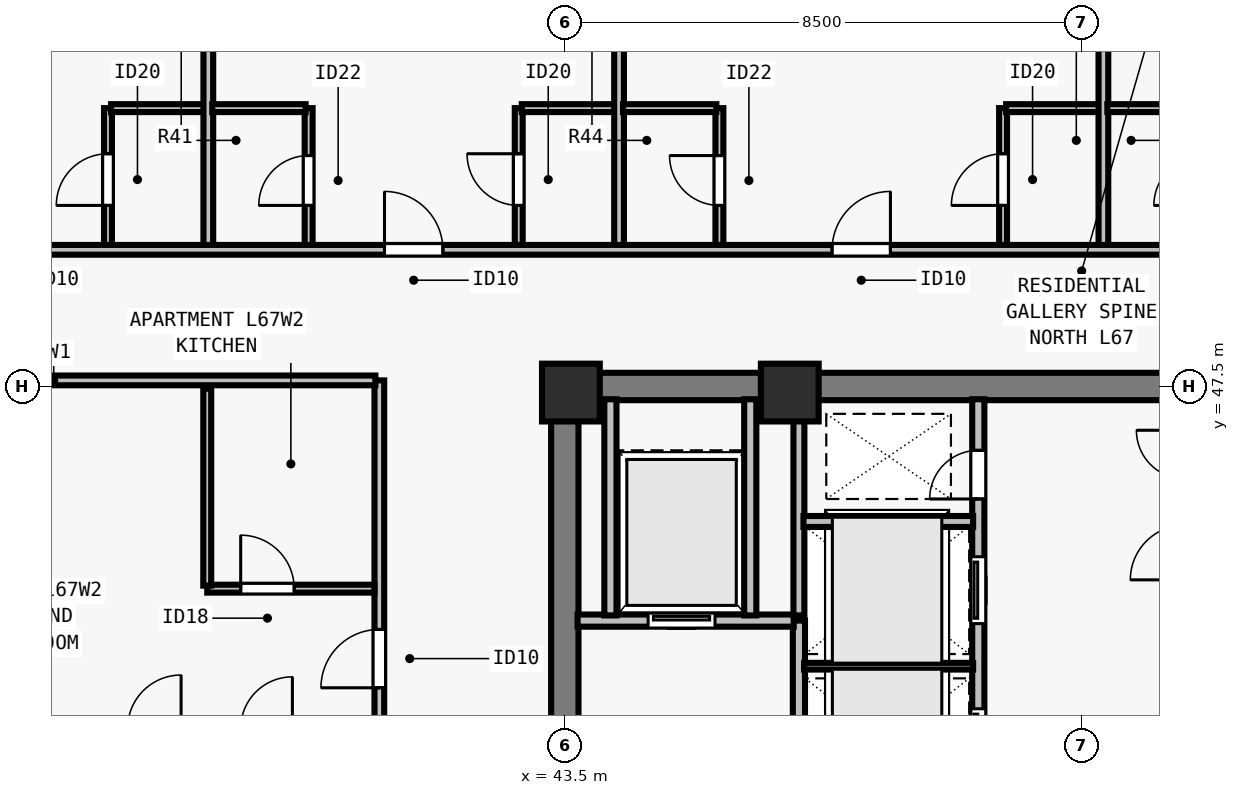
"""IFC4 building model, lengths in metres.
Left out: names, types, materials, properties, quantities, classifications, styles, units other than length and angle.
Written with IfcOpenShell. Run it as: python <this file> out.ifc"""

import sys

from ifc_helpers import new_model, si_unit, direction, frame, frame_2d, origin, origin_2d, place, context, subcontext, project, spatial, rectangle, extrude, element, fill, save


model = new_model("IFC4")
c1 = context("Model", 3, precision=1e-05, world=origin(), true_north=direction((0.0, 1.0)))
c2 = subcontext(c1, "Body", "Model", "MODEL_VIEW")
j1 = project(units=[si_unit("LENGTHUNIT", "METRE"), si_unit("PLANEANGLEUNIT", "RADIAN")], contexts=[c1])
p1 = place(None, origin())
s1 = spatial("IfcSite", under=j1, at=p1, CompositionType="ELEMENT")
p2 = place(p1, origin())
s2 = spatial("IfcBuilding", under=s1, at=p2, CompositionType="ELEMENT")
p3 = place(p2, frame((0.0, 0.0, 244.5)))
s3 = spatial("IfcBuildingStorey", under=s2, at=p3, CompositionType="ELEMENT", Elevation=244.5)
for number, where, z_axis, x_axis in (
    (1, (43.6, 47.4, 0.0), (0.0, 0.0, 1.0), (1.0, 0.0, 0.0)),
    (2, (47.2, 47.4, 0.0), (0.0, 0.0, 1.0), (1.0, 0.0, 0.0)),
):
    element("IfcColumn", number, at=place(p3, frame(where, z_axis=z_axis, x_axis=x_axis)), inside=s3, PredefinedType="COLUMN", context=c2, shape_type="SweptSolid", body=[
        extrude(rectangle(XDim=0.95, YDim=0.95, at=origin_2d()), origin(), (0.0, 0.0, 1.0), 3.5),
    ])
p4 = place(p3, frame((43.275, 47.5, 0.0), z_axis=(0.0, 0.0, 1.0), x_axis=(1.0, 0.0, 0.0)))
e3 = element("IfcWall", 3, at=p4, inside=s3, PredefinedType="SHEAR", context=c2, shape_type="SweptSolid", body=[
    extrude(rectangle(XDim=17.45, YDim=0.45, at=frame_2d((8.725, 0.0))), origin(), (0.0, 0.0, 1.0), 3.29),
])
p5 = place(p3, frame((43.5, 40.8, 0.0), z_axis=(0.0, 0.0, 1.0), x_axis=(0.0, 1.0, 0.0)))
e4 = element("IfcWall", 4, at=p5, inside=s3, PredefinedType="SHEAR", context=c2, shape_type="SweptSolid", body=[
    extrude(rectangle(XDim=6.485, YDim=0.45, at=frame_2d((3.242, 0.0))), origin(), (0.0, 0.0, 1.0), 3.29),
])
p6 = place(p3, frame((50.3, 40.585, 0.0), z_axis=(0.0, 0.0, 1.0), x_axis=(0.0, 1.0, 0.0)))
e5 = element("IfcWall", 5, at=p6, inside=s3, PredefinedType="SOLIDWALL", context=c2, shape_type="SweptSolid", body=[
    extrude(rectangle(XDim=6.705, YDim=0.2, at=frame_2d((3.353, 0.0))), origin(), (0.0, 0.0, 1.0), 3.29),
])
p7 = place(p6, frame((0.515, 0.0, 0.0)))
e6 = element("IfcOpeningElement", 6, at=p7, cuts=e5, PredefinedType="OPENING", context=c2, shape_type="SweptSolid", body=[
    extrude(rectangle(XDim=1.1, YDim=2.2, at=frame_2d((0.55, 1.1))), frame((0.0, 0.11, 0.0), z_axis=(0.0, -1.0, 0.0), x_axis=(1.0, 0.0, 0.0)), (0.0, 0.0, 1.0), 0.22),
])
p8 = place(p6, frame((3.015, 0.0, 0.0)))
e7 = element("IfcOpeningElement", 7, at=p8, cuts=e5, PredefinedType="OPENING", context=c2, shape_type="SweptSolid", body=[
    extrude(rectangle(XDim=1.1, YDim=2.2, at=frame_2d((0.55, 1.1))), frame((0.0, 0.11, 0.0), z_axis=(0.0, -1.0, 0.0), x_axis=(1.0, 0.0, 0.0)), (0.0, 0.0, 1.0), 0.22),
])
p9 = place(p6, frame((5.065, 0.0, 0.0)))
e8 = element("IfcOpeningElement", 8, at=p9, cuts=e5, PredefinedType="OPENING", context=c2, shape_type="SweptSolid", body=[
    extrude(rectangle(XDim=0.8, YDim=2.08, at=frame_2d((0.4, 1.04))), frame((0.0, 0.11, 0.0), z_axis=(0.0, -1.0, 0.0), x_axis=(1.0, 0.0, 0.0)), (0.0, 0.0, 1.0), 0.22),
])
p10 = place(p3, frame((47.35, 38.785, 0.0), z_axis=(0.0, 0.0, 1.0), x_axis=(0.0, 1.0, 0.0)))
e9 = element("IfcWall", 9, at=p10, inside=s3, PredefinedType="SOLIDWALL", context=c2, shape_type="SweptSolid", body=[
    extrude(rectangle(XDim=4.865, YDim=0.2, at=frame_2d((2.433, 0.0))), origin(), (0.0, 0.0, 1.0), 3.29),
])
p11 = place(p10, frame((0.265, 0.0, 0.0)))
e10 = element("IfcOpeningElement", 10, at=p11, cuts=e9, PredefinedType="OPENING", context=c2, shape_type="SweptSolid", body=[
    extrude(rectangle(XDim=1.0, YDim=2.15, at=frame_2d((0.5, 1.075))), frame((0.0, 0.11, 0.0), z_axis=(0.0, -1.0, 0.0), x_axis=(1.0, 0.0, 0.0)), (0.0, 0.0, 1.0), 0.22),
])
p12 = place(p3, frame((43.71, 43.65, 0.0), z_axis=(0.0, 0.0, 1.0), x_axis=(1.0, 0.0, 0.0)))
e11 = element("IfcWall", 11, at=p12, inside=s3, PredefinedType="SOLIDWALL", context=c2, shape_type="SweptSolid", body=[
    extrude(rectangle(XDim=3.555, YDim=0.2, at=frame_2d((1.777, 0.0))), origin(), (0.0, 0.0, 1.0), 3.29),
])
p13 = place(p12, frame((1.16, 0.0, 0.0)))
e12 = element("IfcOpeningElement", 12, at=p13, cuts=e11, PredefinedType="OPENING", context=c2, shape_type="SweptSolid", body=[
    extrude(rectangle(XDim=1.1, YDim=2.2, at=frame_2d((0.55, 1.1))), frame((0.0, 0.11, 0.0), z_axis=(0.0, -1.0, 0.0), x_axis=(1.0, 0.0, 0.0)), (0.0, 0.0, 1.0), 0.22),
])
for number, where, z_axis, x_axis in (
    (13, (46.55, 43.735, 0.0), (0.0, 0.0, 1.0), (0.0, 1.0, 0.0)),
    (14, (44.25, 43.735, 0.0), (0.0, 0.0, 1.0), (0.0, 1.0, 0.0)),
):
    element("IfcWall", number, at=place(p3, frame(where, z_axis=z_axis, x_axis=x_axis)), inside=s3, PredefinedType="SOLIDWALL", context=c2, shape_type="SweptSolid", body=[
        extrude(rectangle(XDim=3.555, YDim=0.2, at=frame_2d((1.777, 0.0))), origin(), (0.0, 0.0, 1.0), 3.29),
    ])
p14 = place(p3, frame((47.35, 43.735, 0.0), z_axis=(0.0, 0.0, 1.0), x_axis=(0.0, 1.0, 0.0)))
e15 = element("IfcWall", 15, at=p14, inside=s3, PredefinedType="SOLIDWALL", context=c2, shape_type="SweptSolid", body=[
    extrude(rectangle(XDim=3.555, YDim=0.18, at=frame_2d((1.777, 0.0))), origin(), (0.0, 0.0, 1.0), 3.29),
])
p15 = place(p3, frame((47.435, 42.9, 0.0), z_axis=(0.0, 0.0, 1.0), x_axis=(1.0, 0.0, 0.0)))
e16 = element("IfcWall", 16, at=p15, inside=s3, PredefinedType="PARTITIONING", context=c2, shape_type="SweptSolid", body=[
    extrude(rectangle(XDim=2.78, YDim=0.11, at=frame_2d((1.39, 0.0))), origin(), (0.0, 0.0, 1.0), 3.29),
])
p16 = place(p3, frame((47.425, 45.28, 0.0), z_axis=(0.0, 0.0, 1.0), x_axis=(1.0, 0.0, 0.0)))
e17 = element("IfcWall", 17, at=p16, inside=s3, PredefinedType="SOLIDWALL", context=c2, shape_type="SweptSolid", body=[
    extrude(rectangle(XDim=2.79, YDim=0.18, at=frame_2d((1.395, 0.0))), origin(), (0.0, 0.0, 1.0), 3.29),
])
p17 = place(p3, frame((29.805, 49.748, 0.0), z_axis=(0.0, 0.0, 1.0), x_axis=(1.0, 0.0, 0.0)))
e18 = element("IfcWall", 18, at=p17, inside=s3, PredefinedType="PARTITIONING", context=c2, shape_type="SweptSolid", body=[
    extrude(rectangle(XDim=44.39, YDim=0.16, at=frame_2d((22.195, 0.0))), origin(), (0.0, 0.0, 1.0), 2.958),
])
p18 = place(p17, frame((3.494, 0.0, 0.0)))
e19 = element("IfcOpeningElement", 19, at=p18, cuts=e18, PredefinedType="OPENING", context=c2, shape_type="SweptSolid", body=[
    extrude(rectangle(XDim=0.96, YDim=2.18, at=frame_2d((0.48, 1.09))), frame((0.0, 0.09, 0.0), z_axis=(0.0, -1.0, 0.0), x_axis=(1.0, 0.0, 0.0)), (0.0, 0.0, 1.0), 0.18),
])
p19 = place(p17, frame((10.73, 0.0, 0.0)))
e20 = element("IfcOpeningElement", 20, at=p19, cuts=e18, PredefinedType="OPENING", context=c2, shape_type="SweptSolid", body=[
    extrude(rectangle(XDim=0.96, YDim=2.18, at=frame_2d((0.48, 1.09))), frame((0.0, 0.09, 0.0), z_axis=(0.0, -1.0, 0.0), x_axis=(1.0, 0.0, 0.0)), (0.0, 0.0, 1.0), 0.18),
])
p20 = place(p17, frame((18.09, 0.0, 0.0)))
e21 = element("IfcOpeningElement", 21, at=p20, cuts=e18, PredefinedType="OPENING", context=c2, shape_type="SweptSolid", body=[
    extrude(rectangle(XDim=0.96, YDim=2.18, at=frame_2d((0.48, 1.09))), frame((0.0, 0.09, 0.0), z_axis=(0.0, -1.0, 0.0), x_axis=(1.0, 0.0, 0.0)), (0.0, 0.0, 1.0), 0.18),
])
p21 = place(p17, frame((25.45, 0.0, 0.0)))
e22 = element("IfcOpeningElement", 22, at=p21, cuts=e18, PredefinedType="OPENING", context=c2, shape_type="SweptSolid", body=[
    extrude(rectangle(XDim=0.96, YDim=2.18, at=frame_2d((0.48, 1.09))), frame((0.0, 0.09, 0.0), z_axis=(0.0, -1.0, 0.0), x_axis=(1.0, 0.0, 0.0)), (0.0, 0.0, 1.0), 0.18),
])
p22 = place(p17, frame((32.81, 0.0, 0.0)))
e23 = element("IfcOpeningElement", 23, at=p22, cuts=e18, PredefinedType="OPENING", context=c2, shape_type="SweptSolid", body=[
    extrude(rectangle(XDim=0.96, YDim=2.18, at=frame_2d((0.48, 1.09))), frame((0.0, 0.09, 0.0), z_axis=(0.0, -1.0, 0.0), x_axis=(1.0, 0.0, 0.0)), (0.0, 0.0, 1.0), 0.18),
])
p23 = place(p17, frame((40.294, 0.0, 0.0)))
e24 = element("IfcOpeningElement", 24, at=p23, cuts=e18, PredefinedType="OPENING", context=c2, shape_type="SweptSolid", body=[
    extrude(rectangle(XDim=0.96, YDim=2.18, at=frame_2d((0.48, 1.09))), frame((0.0, 0.09, 0.0), z_axis=(0.0, -1.0, 0.0), x_axis=(1.0, 0.0, 0.0)), (0.0, 0.0, 1.0), 0.18),
])
p24 = place(p3, frame((40.45, 30.4, 0.0), z_axis=(0.0, 0.0, 1.0), x_axis=(0.0, 1.0, 0.0)))
e25 = element("IfcWall", 25, at=p24, inside=s3, PredefinedType="PARTITIONING", context=c2, shape_type="SweptSolid", body=[
    extrude(rectangle(XDim=17.2, YDim=0.16, at=frame_2d((8.6, 0.0))), origin(), (0.0, 0.0, 1.0), 3.29),
])
p25 = place(p24, frame((3.545, 0.0, 0.0)))
e26 = element("IfcOpeningElement", 26, at=p25, cuts=e25, PredefinedType="OPENING", context=c2, shape_type="SweptSolid", body=[
    extrude(rectangle(XDim=0.96, YDim=2.18, at=frame_2d((0.48, 1.09))), frame((0.0, 0.09, 0.0), z_axis=(0.0, -1.0, 0.0), x_axis=(1.0, 0.0, 0.0)), (0.0, 0.0, 1.0), 0.18),
])
p26 = place(p24, frame((12.145, 0.0, 0.0)))
e27 = element("IfcOpeningElement", 27, at=p26, cuts=e25, PredefinedType="OPENING", context=c2, shape_type="SweptSolid", body=[
    extrude(rectangle(XDim=0.96, YDim=2.18, at=frame_2d((0.48, 1.09))), frame((0.0, 0.09, 0.0), z_axis=(0.0, -1.0, 0.0), x_axis=(1.0, 0.0, 0.0)), (0.0, 0.0, 1.0), 0.18),
])
p27 = place(p3, frame((29.805, 47.6, 0.0), z_axis=(0.0, 0.0, 1.0), x_axis=(1.0, 0.0, 0.0)))
e28 = element("IfcWall", 28, at=p27, inside=s3, PredefinedType="PARTITIONING", context=c2, shape_type="SweptSolid", body=[
    extrude(rectangle(XDim=10.58, YDim=0.16, at=frame_2d((5.29, 0.0))), origin(), (0.0, 0.0, 1.0), 3.29),
])
p28 = place(p3, frame((35.988, 49.827, 0.0), z_axis=(0.0, 0.0, 1.0), x_axis=(0.0, 1.0, 0.0)))
e29 = element("IfcWall", 29, at=p28, inside=s3, PredefinedType="PLUMBINGWALL", context=c2, shape_type="SweptSolid", body=[
    extrude(rectangle(XDim=2.25, YDim=0.13, at=frame_2d((1.125, 0.0))), origin(), (0.0, 0.0, 1.0), 3.29),
])
p29 = place(p28, frame((0.65, 0.0, 0.0)))
e30 = element("IfcOpeningElement", 30, at=p29, cuts=e29, PredefinedType="OPENING", context=c2, shape_type="SweptSolid", body=[
    extrude(rectangle(XDim=0.85, YDim=2.1, at=frame_2d((0.425, 1.05))), frame((0.0, 0.075, 0.0), z_axis=(0.0, -1.0, 0.0), x_axis=(1.0, 0.0, 0.0)), (0.0, 0.0, 1.0), 0.15),
])
p30 = place(p3, frame((36.038, 52.077, 0.0), z_axis=(0.0, 0.0, 1.0), x_axis=(1.0, 0.0, 0.0)))
e31 = element("IfcWall", 31, at=p30, inside=s3, PredefinedType="PLUMBINGWALL", context=c2, shape_type="SweptSolid", body=[
    extrude(rectangle(XDim=1.6, YDim=0.13, at=frame_2d((0.8, 0.0))), origin(), (0.0, 0.0, 1.0), 2.958),
])
p31 = place(p3, frame((37.637, 49.827, 0.0), z_axis=(0.0, 0.0, 1.0), x_axis=(0.0, 1.0, 0.0)))
e32 = element("IfcWall", 32, at=p31, inside=s3, PredefinedType="PARTITIONING", context=c2, shape_type="SweptSolid", body=[
    extrude(rectangle(XDim=11.368, YDim=0.16, at=frame_2d((5.684, 0.0))), origin(), (0.0, 0.0, 1.0), 2.573),
])
p32 = place(p3, frame((39.288, 49.827, 0.0), z_axis=(0.0, 0.0, 1.0), x_axis=(0.0, 1.0, 0.0)))
e33 = element("IfcWall", 33, at=p32, inside=s3, PredefinedType="PLUMBINGWALL", context=c2, shape_type="SweptSolid", body=[
    extrude(rectangle(XDim=2.25, YDim=0.13, at=frame_2d((1.125, 0.0))), origin(), (0.0, 0.0, 1.0), 3.29),
])
p33 = place(p32, frame((0.65, 0.0, 0.0)))
e34 = element("IfcOpeningElement", 34, at=p33, cuts=e33, PredefinedType="OPENING", context=c2, shape_type="SweptSolid", body=[
    extrude(rectangle(XDim=0.82, YDim=2.1, at=frame_2d((0.41, 1.05))), frame((0.0, 0.075, 0.0), z_axis=(0.0, -1.0, 0.0), x_axis=(1.0, 0.0, 0.0)), (0.0, 0.0, 1.0), 0.15),
])
p34 = place(p3, frame((37.702, 52.077, 0.0), z_axis=(0.0, 0.0, 1.0), x_axis=(1.0, 0.0, 0.0)))
e35 = element("IfcWall", 35, at=p34, inside=s3, PredefinedType="PLUMBINGWALL", context=c2, shape_type="SweptSolid", body=[
    extrude(rectangle(XDim=1.535, YDim=0.13, at=frame_2d((0.768, 0.0))), origin(), (0.0, 0.0, 1.0), 3.29),
])
p35 = place(p3, frame((42.742, 49.827, 0.0), z_axis=(0.0, 0.0, 1.0), x_axis=(0.0, 1.0, 0.0)))
e36 = element("IfcWall", 36, at=p35, inside=s3, PredefinedType="PLUMBINGWALL", context=c2, shape_type="SweptSolid", body=[
    extrude(rectangle(XDim=2.25, YDim=0.13, at=frame_2d((1.125, 0.0))), origin(), (0.0, 0.0, 1.0), 3.29),
])
p36 = place(p35, frame((0.65, 0.0, 0.0)))
e37 = element("IfcOpeningElement", 37, at=p36, cuts=e36, PredefinedType="OPENING", context=c2, shape_type="SweptSolid", body=[
    extrude(rectangle(XDim=0.85, YDim=2.1, at=frame_2d((0.425, 1.05))), frame((0.0, 0.075, 0.0), z_axis=(0.0, -1.0, 0.0), x_axis=(1.0, 0.0, 0.0)), (0.0, 0.0, 1.0), 0.15),
])
p37 = place(p3, frame((42.792, 52.077, 0.0), z_axis=(0.0, 0.0, 1.0), x_axis=(1.0, 0.0, 0.0)))
e38 = element("IfcWall", 38, at=p37, inside=s3, PredefinedType="PLUMBINGWALL", context=c2, shape_type="SweptSolid", body=[
    extrude(rectangle(XDim=1.6, YDim=0.13, at=frame_2d((0.8, 0.0))), origin(), (0.0, 0.0, 1.0), 3.29),
])
p38 = place(p3, frame((44.393, 49.827, 0.0), z_axis=(0.0, 0.0, 1.0), x_axis=(0.0, 1.0, 0.0)))
e39 = element("IfcWall", 39, at=p38, inside=s3, PredefinedType="PARTITIONING", context=c2, shape_type="SweptSolid", body=[
    extrude(rectangle(XDim=11.368, YDim=0.16, at=frame_2d((5.684, 0.0))), origin(), (0.0, 0.0, 1.0), 3.29),
])
p39 = place(p3, frame((46.042, 49.827, 0.0), z_axis=(0.0, 0.0, 1.0), x_axis=(0.0, 1.0, 0.0)))
e40 = element("IfcWall", 40, at=p39, inside=s3, PredefinedType="PLUMBINGWALL", context=c2, shape_type="SweptSolid", body=[
    extrude(rectangle(XDim=2.25, YDim=0.13, at=frame_2d((1.125, 0.0))), origin(), (0.0, 0.0, 1.0), 3.29),
])
p40 = place(p39, frame((0.65, 0.0, 0.0)))
e41 = element("IfcOpeningElement", 41, at=p40, cuts=e40, PredefinedType="OPENING", context=c2, shape_type="SweptSolid", body=[
    extrude(rectangle(XDim=0.82, YDim=2.1, at=frame_2d((0.41, 1.05))), frame((0.0, 0.075, 0.0), z_axis=(0.0, -1.0, 0.0), x_axis=(1.0, 0.0, 0.0)), (0.0, 0.0, 1.0), 0.15),
])
p41 = place(p3, frame((44.458, 52.077, 0.0), z_axis=(0.0, 0.0, 1.0), x_axis=(1.0, 0.0, 0.0)))
e42 = element("IfcWall", 42, at=p41, inside=s3, PredefinedType="PLUMBINGWALL", context=c2, shape_type="SweptSolid", body=[
    extrude(rectangle(XDim=1.535, YDim=0.13, at=frame_2d((0.768, 0.0))), origin(), (0.0, 0.0, 1.0), 3.29),
])
p42 = place(p3, frame((50.708, 49.827, 0.0), z_axis=(0.0, 0.0, 1.0), x_axis=(0.0, 1.0, 0.0)))
e43 = element("IfcWall", 43, at=p42, inside=s3, PredefinedType="PLUMBINGWALL", context=c2, shape_type="SweptSolid", body=[
    extrude(rectangle(XDim=2.25, YDim=0.13, at=frame_2d((1.125, 0.0))), origin(), (0.0, 0.0, 1.0), 3.29),
])
p43 = place(p42, frame((0.65, 0.0, 0.0)))
e44 = element("IfcOpeningElement", 44, at=p43, cuts=e43, PredefinedType="OPENING", context=c2, shape_type="SweptSolid", body=[
    extrude(rectangle(XDim=0.85, YDim=2.1, at=frame_2d((0.425, 1.05))), frame((0.0, 0.075, 0.0), z_axis=(0.0, -1.0, 0.0), x_axis=(1.0, 0.0, 0.0)), (0.0, 0.0, 1.0), 0.15),
])
p44 = place(p3, frame((50.758, 52.077, 0.0), z_axis=(0.0, 0.0, 1.0), x_axis=(1.0, 0.0, 0.0)))
e45 = element("IfcWall", 45, at=p44, inside=s3, PredefinedType="PLUMBINGWALL", context=c2, shape_type="SweptSolid", body=[
    extrude(rectangle(XDim=1.6, YDim=0.13, at=frame_2d((0.8, 0.0))), origin(), (0.0, 0.0, 1.0), 3.29),
])
p45 = place(p3, frame((52.357, 49.827, 0.0), z_axis=(0.0, 0.0, 1.0), x_axis=(0.0, 1.0, 0.0)))
e46 = element("IfcWall", 46, at=p45, inside=s3, PredefinedType="PARTITIONING", context=c2, shape_type="SweptSolid", body=[
    extrude(rectangle(XDim=11.368, YDim=0.16, at=frame_2d((5.684, 0.0))), origin(), (0.0, 0.0, 1.0), 2.958),
])
p46 = place(p3, frame((52.423, 52.077, 0.0), z_axis=(0.0, 0.0, 1.0), x_axis=(1.0, 0.0, 0.0)))
e47 = element("IfcWall", 47, at=p46, inside=s3, PredefinedType="PLUMBINGWALL", context=c2, shape_type="SweptSolid", body=[
    extrude(rectangle(XDim=1.535, YDim=0.13, at=frame_2d((0.768, 0.0))), origin(), (0.0, 0.0, 1.0), 3.29),
])
p47 = place(p3, frame((37.62, 44.175, 0.0), z_axis=(0.0, 0.0, 1.0), x_axis=(1.0, 0.0, 0.0)))
e48 = element("IfcWall", 48, at=p47, inside=s3, PredefinedType="PLUMBINGWALL", context=c2, shape_type="SweptSolid", body=[
    extrude(rectangle(XDim=2.75, YDim=0.13, at=frame_2d((1.375, 0.0))), origin(), (0.0, 0.0, 1.0), 2.958),
])
p48 = place(p47, frame((0.55, 0.0, 0.0)))
e49 = element("IfcOpeningElement", 49, at=p48, cuts=e48, PredefinedType="OPENING", context=c2, shape_type="SweptSolid", body=[
    extrude(rectangle(XDim=0.88, YDim=2.1, at=frame_2d((0.44, 1.05))), frame((0.0, 0.075, 0.0), z_axis=(0.0, -1.0, 0.0), x_axis=(1.0, 0.0, 0.0)), (0.0, 0.0, 1.0), 0.15),
])
p49 = place(p3, frame((37.62, 44.225, 0.0), z_axis=(0.0, 0.0, 1.0), x_axis=(0.0, 1.0, 0.0)))
e50 = element("IfcWall", 50, at=p49, inside=s3, PredefinedType="PLUMBINGWALL", context=c2, shape_type="SweptSolid", body=[
    extrude(rectangle(XDim=3.24, YDim=0.13, at=frame_2d((1.62, 0.0))), origin(), (0.0, 0.0, 1.0), 3.29),
])
p50 = place(p13, origin())
e51 = element("IfcDoor", 51, at=p50, inside=s3, OperationType="SLIDING_TO_LEFT", PredefinedType="DOOR", context=c2, shape_type="SweptSolid", body=[
    extrude(rectangle(XDim=1.1, YDim=2.2, at=frame_2d((0.55, 1.1))), frame((0.0, 0.025, 0.0), z_axis=(0.0, -1.0, 0.0), x_axis=(1.0, 0.0, 0.0)), (0.0, 0.0, 1.0), 0.05),
])
fill(e12, e51)
p51 = place(p7, origin())
e52 = element("IfcDoor", 52, at=p51, inside=s3, OperationType="SLIDING_TO_LEFT", PredefinedType="DOOR", context=c2, shape_type="SweptSolid", body=[
    extrude(rectangle(XDim=1.1, YDim=2.2, at=frame_2d((0.55, 1.1))), frame((0.0, 0.025, 0.0), z_axis=(0.0, -1.0, 0.0), x_axis=(1.0, 0.0, 0.0)), (0.0, 0.0, 1.0), 0.05),
])
fill(e6, e52)
p52 = place(p8, origin())
e53 = element("IfcDoor", 53, at=p52, inside=s3, OperationType="SLIDING_TO_LEFT", PredefinedType="DOOR", context=c2, shape_type="SweptSolid", body=[
    extrude(rectangle(XDim=1.1, YDim=2.2, at=frame_2d((0.55, 1.1))), frame((0.0, 0.025, 0.0), z_axis=(0.0, -1.0, 0.0), x_axis=(1.0, 0.0, 0.0)), (0.0, 0.0, 1.0), 0.05),
])
fill(e7, e53)
p53 = place(p9, origin())
e54 = element("IfcDoor", 54, at=p53, inside=s3, OperationType="SINGLE_SWING_LEFT", PredefinedType="DOOR", context=c2, shape_type="SweptSolid", body=[
    extrude(rectangle(XDim=0.8, YDim=2.08, at=frame_2d((0.4, 1.04))), frame((0.0, 0.025, 0.0), z_axis=(0.0, -1.0, 0.0), x_axis=(1.0, 0.0, 0.0)), (0.0, 0.0, 1.0), 0.05),
])
fill(e8, e54)
p54 = place(p29, origin())
e55 = element("IfcDoor", 55, at=p54, inside=s3, OperationType="SINGLE_SWING_LEFT", PredefinedType="DOOR", context=c2, shape_type="SweptSolid", body=[
    extrude(rectangle(XDim=0.85, YDim=2.1, at=frame_2d((0.425, 1.05))), frame((0.0, 0.025, 0.0), z_axis=(0.0, -1.0, 0.0), x_axis=(1.0, 0.0, 0.0)), (0.0, 0.0, 1.0), 0.05),
])
fill(e30, e55)
p55 = place(p33, origin())
e56 = element("IfcDoor", 56, at=p55, inside=s3, OperationType="SINGLE_SWING_LEFT", PredefinedType="DOOR", context=c2, shape_type="SweptSolid", body=[
    extrude(rectangle(XDim=0.82, YDim=2.1, at=frame_2d((0.41, 1.05))), frame((0.0, 0.025, 0.0), z_axis=(0.0, -1.0, 0.0), x_axis=(1.0, 0.0, 0.0)), (0.0, 0.0, 1.0), 0.05),
])
fill(e34, e56)
p56 = place(p36, origin())
e57 = element("IfcDoor", 57, at=p56, inside=s3, OperationType="SINGLE_SWING_RIGHT", PredefinedType="DOOR", context=c2, shape_type="SweptSolid", body=[
    extrude(rectangle(XDim=0.85, YDim=2.1, at=frame_2d((0.425, 1.05))), frame((0.0, 0.025, 0.0), z_axis=(0.0, -1.0, 0.0), x_axis=(1.0, 0.0, 0.0)), (0.0, 0.0, 1.0), 0.05),
])
fill(e37, e57)
p57 = place(p19, origin())
e58 = element("IfcDoor", 58, at=p57, inside=s3, OperationType="SINGLE_SWING_LEFT", PredefinedType="DOOR", context=c2, shape_type="SweptSolid", body=[
    extrude(rectangle(XDim=0.96, YDim=2.18, at=frame_2d((0.48, 1.09))), frame((0.0, 0.025, 0.0), z_axis=(0.0, -1.0, 0.0), x_axis=(1.0, 0.0, 0.0)), (0.0, 0.0, 1.0), 0.05),
])
fill(e20, e58)
p58 = place(p40, origin())
e59 = element("IfcDoor", 59, at=p58, inside=s3, OperationType="SINGLE_SWING_RIGHT", PredefinedType="DOOR", context=c2, shape_type="SweptSolid", body=[
    extrude(rectangle(XDim=0.82, YDim=2.1, at=frame_2d((0.41, 1.05))), frame((0.0, 0.025, 0.0), z_axis=(0.0, -1.0, 0.0), x_axis=(1.0, 0.0, 0.0)), (0.0, 0.0, 1.0), 0.05),
])
fill(e41, e59)
p59 = place(p43, origin())
e60 = element("IfcDoor", 60, at=p59, inside=s3, OperationType="SINGLE_SWING_LEFT", PredefinedType="DOOR", context=c2, shape_type="SweptSolid", body=[
    extrude(rectangle(XDim=0.85, YDim=2.1, at=frame_2d((0.425, 1.05))), frame((0.0, 0.025, 0.0), z_axis=(0.0, -1.0, 0.0), x_axis=(1.0, 0.0, 0.0)), (0.0, 0.0, 1.0), 0.05),
])
fill(e44, e60)
p60 = place(p20, origin())
e61 = element("IfcDoor", 61, at=p60, inside=s3, OperationType="SINGLE_SWING_RIGHT", PredefinedType="DOOR", context=c2, shape_type="SweptSolid", body=[
    extrude(rectangle(XDim=0.96, YDim=2.18, at=frame_2d((0.48, 1.09))), frame((0.0, 0.025, 0.0), z_axis=(0.0, -1.0, 0.0), x_axis=(1.0, 0.0, 0.0)), (0.0, 0.0, 1.0), 0.05),
])
fill(e21, e61)
p61 = place(p48, origin())
e62 = element("IfcDoor", 62, at=p61, inside=s3, OperationType="SINGLE_SWING_LEFT", PredefinedType="DOOR", context=c2, shape_type="SweptSolid", body=[
    extrude(rectangle(XDim=0.88, YDim=2.1, at=frame_2d((0.44, 1.05))), frame((0.0, 0.025, 0.0), z_axis=(0.0, -1.0, 0.0), x_axis=(1.0, 0.0, 0.0)), (0.0, 0.0, 1.0), 0.05),
])
fill(e49, e62)
p62 = place(p26, origin())
e63 = element("IfcDoor", 63, at=p62, inside=s3, OperationType="SINGLE_SWING_LEFT", PredefinedType="DOOR", context=c2, shape_type="SweptSolid", body=[
    extrude(rectangle(XDim=0.96, YDim=2.18, at=frame_2d((0.48, 1.09))), frame((0.0, 0.025, 0.0), z_axis=(0.0, -1.0, 0.0), x_axis=(1.0, 0.0, 0.0)), (0.0, 0.0, 1.0), 0.05),
])
fill(e27, e63)
save(model, sys.argv[1])
